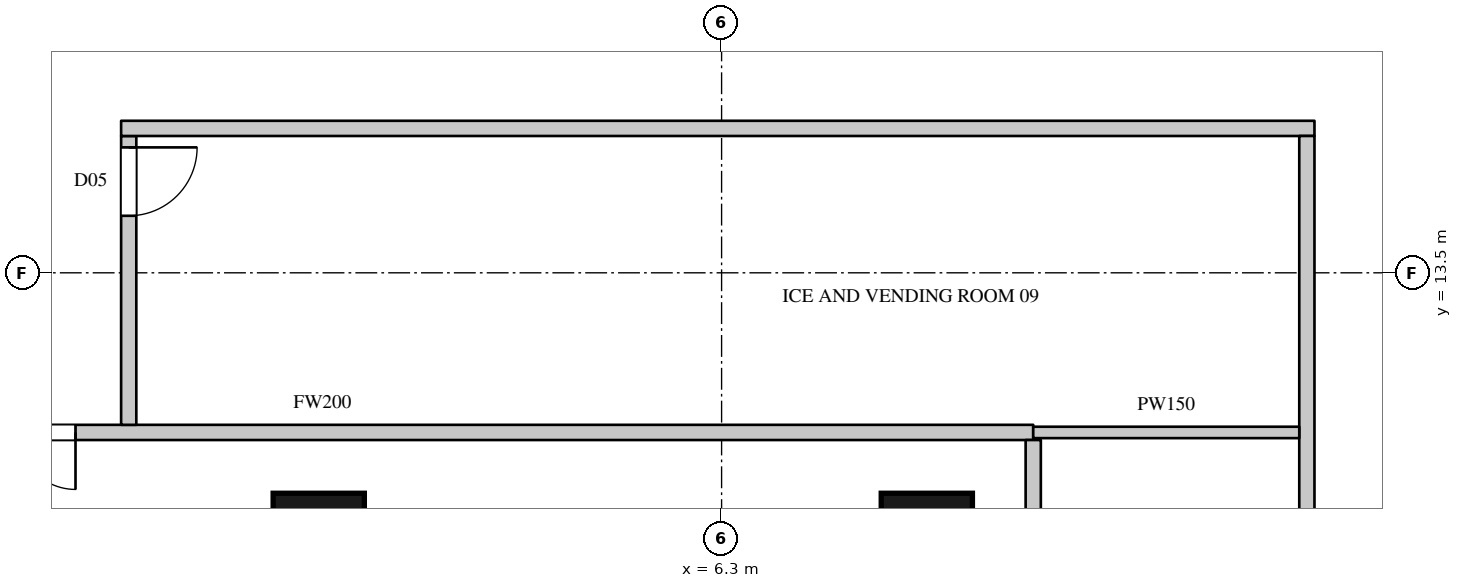
"""IFC4 building model, lengths in metres.
Left out: names, types, materials, properties, quantities, classifications, styles, units other than length and angle.
Written with IfcOpenShell. Run it as: python <this file> out.ifc"""

import sys

from ifc_helpers import new_model, si_unit, direction, frame, frame_2d, origin, origin_2d, place, context, subcontext, project, spatial, rectangle, circle, extrude, element, fill, save


model = new_model("IFC4")
c1 = context("Model", 3, precision=1e-05, world=origin(), true_north=direction((0.0, 1.0)))
c2 = subcontext(c1, "Body", "Model", "MODEL_VIEW")
j1 = project(units=[si_unit("LENGTHUNIT", "METRE"), si_unit("PLANEANGLEUNIT", "RADIAN")], contexts=[c1])
p1 = place(None, origin())
s1 = spatial("IfcSite", under=j1, at=p1, CompositionType="ELEMENT")
p2 = place(p1, origin())
s2 = spatial("IfcBuilding", under=s1, at=p2, CompositionType="ELEMENT")
p3 = place(p2, frame((0.0, 0.0, 62.7)))
s3 = spatial("IfcBuildingStorey", under=s2, at=p3, CompositionType="ELEMENT", Elevation=62.7)
for number, where, z_axis, x_axis in (
    (1, (1.0, 10.0, 0.0), (0.0, 0.0, 1.0), (1.0, 0.0, 0.0)),
    (2, (9.0, 10.0, 0.0), (0.0, 0.0, 1.0), (1.0, 0.0, 0.0)),
):
    element("IfcColumn", number, at=place(p3, frame(where, z_axis=z_axis, x_axis=x_axis)), inside=s3, PredefinedType="COLUMN", context=c2, shape_type="SweptSolid", body=[
        extrude(circle(Radius=0.6, at=origin_2d()), origin(), (0.0, 0.0, 1.0), 3.6),
    ])
p4 = place(p3, frame((-8.3, 11.4, 0.0), z_axis=(0.0, 0.0, 1.0), x_axis=(1.0, 0.0, 0.0)))
e3 = element("IfcWall", 3, at=p4, inside=s3, PredefinedType="PARTITIONING", context=c2, shape_type="SweptSolid", body=[
    extrude(rectangle(XDim=18.7, YDim=0.2, at=frame_2d((9.35, 0.0))), origin(), (0.0, 0.0, 1.0), 3.3),
])
p5 = place(p4, frame((4.6, 0.0, 0.0)))
e4 = element("IfcOpeningElement", 4, at=p5, cuts=e3, PredefinedType="OPENING", context=c2, shape_type="SweptSolid", body=[
    extrude(rectangle(XDim=1.5, YDim=2.2, at=frame_2d((0.75, 1.1))), frame((0.0, 0.11, 0.0), z_axis=(0.0, -1.0, 0.0), x_axis=(1.0, 0.0, 0.0)), (0.0, 0.0, 1.0), 0.22),
])
p6 = place(p3, frame((-1.5, 11.5, 0.0), z_axis=(0.0, 0.0, 1.0), x_axis=(0.0, 1.0, 0.0)))
e5 = element("IfcWall", 5, at=p6, inside=s3, PredefinedType="PARTITIONING", context=c2, shape_type="SweptSolid", body=[
    extrude(rectangle(XDim=3.8, YDim=0.2, at=frame_2d((1.9, 0.0))), origin(), (0.0, 0.0, 1.0), 3.3),
])
p7 = place(p6, frame((2.75, 0.0, 0.0)))
e6 = element("IfcOpeningElement", 6, at=p7, cuts=e5, PredefinedType="OPENING", context=c2, shape_type="SweptSolid", body=[
    extrude(rectangle(XDim=0.9, YDim=2.2, at=frame_2d((0.45, 1.1))), frame((0.0, 0.11, 0.0), z_axis=(0.0, -1.0, 0.0), x_axis=(1.0, 0.0, 0.0)), (0.0, 0.0, 1.0), 0.22),
])
p8 = place(p3, frame((-1.6, 15.4, 0.0), z_axis=(0.0, 0.0, 1.0), x_axis=(1.0, 0.0, 0.0)))
e7 = element("IfcWall", 7, at=p8, inside=s3, PredefinedType="PARTITIONING", context=c2, shape_type="SweptSolid", body=[
    extrude(rectangle(XDim=15.7, YDim=0.2, at=frame_2d((7.85, 0.0))), origin(), (0.0, 0.0, 1.0), 3.3),
])
p9 = place(p3, frame((10.4, -11.3, 0.0), z_axis=(0.0, 0.0, 1.0), x_axis=(0.0, 1.0, 0.0)))
e8 = element("IfcWall", 8, at=p9, inside=s3, PredefinedType="PARTITIONING", context=c2, shape_type="SweptSolid", body=[
    extrude(rectangle(XDim=22.6, YDim=0.2, at=frame_2d((11.3, 0.0))), origin(), (0.0, 0.0, 1.0), 3.3),
])
p10 = place(p9, frame((4.8, 0.0, 0.0)))
e9 = element("IfcOpeningElement", 9, at=p10, cuts=e8, PredefinedType="OPENING", context=c2, shape_type="SweptSolid", body=[
    extrude(rectangle(XDim=1.5, YDim=2.2, at=frame_2d((0.75, 1.1))), frame((0.0, 0.11, 0.0), z_axis=(0.0, -1.0, 0.0), x_axis=(1.0, 0.0, 0.0)), (0.0, 0.0, 1.0), 0.22),
])
p11 = place(p9, frame((16.3, 0.0, 0.0)))
e10 = element("IfcOpeningElement", 10, at=p11, cuts=e8, PredefinedType="OPENING", context=c2, shape_type="SweptSolid", body=[
    extrude(rectangle(XDim=1.5, YDim=2.2, at=frame_2d((0.75, 1.1))), frame((0.0, 0.11, 0.0), z_axis=(0.0, -1.0, 0.0), x_axis=(1.0, 0.0, 0.0)), (0.0, 0.0, 1.0), 0.22),
])
p12 = place(p9, frame((11.95, 0.0, 0.0)))
e11 = element("IfcOpeningElement", 11, at=p12, cuts=e8, PredefinedType="OPENING", context=c2, shape_type="SweptSolid", body=[
    extrude(rectangle(XDim=1.5, YDim=2.2, at=frame_2d((0.75, 1.1))), frame((0.0, 0.11, 0.0), z_axis=(0.0, -1.0, 0.0), x_axis=(1.0, 0.0, 0.0)), (0.0, 0.0, 1.0), 0.22),
])
p13 = place(p3, frame((14.0, 6.825, 0.0), z_axis=(0.0, 0.0, 1.0), x_axis=(0.0, 1.0, 0.0)))
e12 = element("IfcWall", 12, at=p13, inside=s3, PredefinedType="PARTITIONING", context=c2, shape_type="SweptSolid", body=[
    extrude(rectangle(XDim=8.475, YDim=0.2, at=frame_2d((4.238, 0.0))), origin(), (0.0, 0.0, 1.0), 3.3),
])
p14 = place(p3, frame((10.4, 11.4, 0.0), z_axis=(0.0, 0.0, 1.0), x_axis=(1.0, 0.0, 0.0)))
e13 = element("IfcWall", 13, at=p14, inside=s3, PredefinedType="PARTITIONING", context=c2, shape_type="SweptSolid", body=[
    extrude(rectangle(XDim=3.5, YDim=0.15, at=frame_2d((1.75, 0.0))), origin(), (0.0, 0.0, 1.0), 3.3),
])
p15 = place(p5, origin())
e14 = element("IfcDoor", 14, at=p15, inside=s3, OperationType="DOUBLE_DOOR_SINGLE_SWING", PredefinedType="DOOR", context=c2, shape_type="SweptSolid", body=[
    extrude(rectangle(XDim=1.5, YDim=2.2, at=frame_2d((0.75, 1.1))), frame((0.0, 0.025, 0.0), z_axis=(0.0, -1.0, 0.0), x_axis=(1.0, 0.0, 0.0)), (0.0, 0.0, 1.0), 0.05),
])
fill(e4, e14)
p16 = place(p7, origin())
e15 = element("IfcDoor", 15, at=p16, inside=s3, OperationType="SINGLE_SWING_LEFT", PredefinedType="DOOR", context=c2, shape_type="SweptSolid", body=[
    extrude(rectangle(XDim=0.9, YDim=2.2, at=frame_2d((0.45, 1.1))), frame((0.0, 0.025, 0.0), z_axis=(0.0, -1.0, 0.0), x_axis=(1.0, 0.0, 0.0)), (0.0, 0.0, 1.0), 0.05),
])
fill(e6, e15)
save(model, sys.argv[1])
